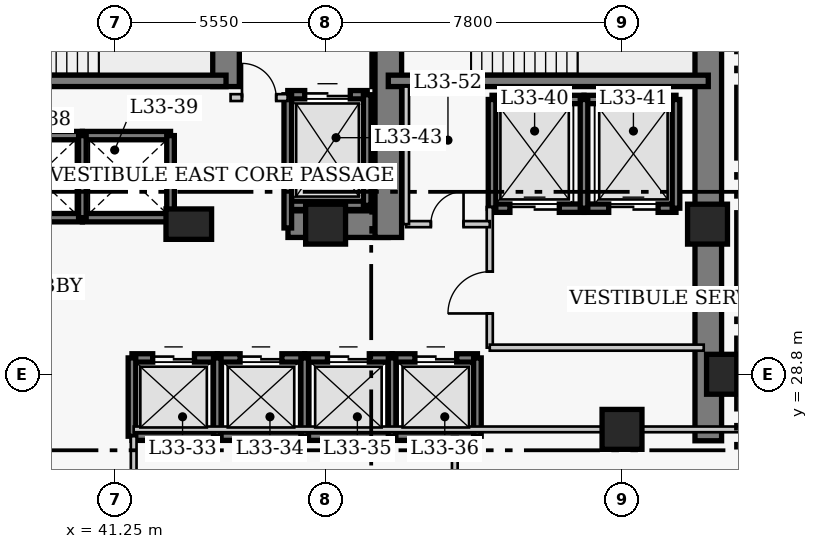
"""IFC4 building model, lengths in metres.
Left out: names, types, materials, properties, quantities, classifications, styles, units other than length and angle.
Written with IfcOpenShell. Run it as: python <this file> out.ifc"""

import sys

from ifc_helpers import new_model, si_unit, direction, frame, frame_2d, origin, origin_2d, place, context, subcontext, project, spatial, rectangle, extrude, element, fill, save


model = new_model("IFC4")
c1 = context("Model", 3, precision=1e-05, world=origin(), true_north=direction((0.0, 1.0)))
c2 = subcontext(c1, "Body", "Model", "MODEL_VIEW")
j1 = project(units=[si_unit("LENGTHUNIT", "METRE"), si_unit("PLANEANGLEUNIT", "RADIAN")], contexts=[c1])
p1 = place(None, origin())
s1 = spatial("IfcSite", under=j1, at=p1, CompositionType="ELEMENT")
p2 = place(p1, origin())
s2 = spatial("IfcBuilding", under=s1, at=p2, CompositionType="ELEMENT")
p3 = place(p2, frame((0.0, 0.0, 134.6)))
s3 = spatial("IfcBuildingStorey", under=s2, at=p3, CompositionType="ELEMENT", Elevation=134.6)
p4 = place(p3, frame((56.87, 27.05, 0.0), z_axis=(0.0, 0.0, 1.0), x_axis=(0.0, 1.0, 0.0)))
e1 = element("IfcWall", 1, at=p4, inside=s3, PredefinedType="SHEAR", context=c2, shape_type="SweptSolid", body=[
    extrude(rectangle(XDim=13.62, YDim=0.7, at=frame_2d((6.81, 0.0))), origin(), (0.0, 0.0, 1.0), 3.8),
])
p5 = place(p3, frame((45.81, 32.75, 0.0), z_axis=(0.0, 0.0, 1.0), x_axis=(1.0, 0.0, 0.0)))
e2 = element("IfcWall", 2, at=p5, inside=s3, PredefinedType="SHEAR", context=c2, shape_type="SweptSolid", body=[
    extrude(rectangle(XDim=2.64, YDim=0.7, at=frame_2d((1.32, 0.0))), origin(), (0.0, 0.0, 1.0), 3.8),
])
p6 = place(p3, frame((44.18, 36.37, 0.0), z_axis=(0.0, 0.0, 1.0), x_axis=(0.0, 1.0, 0.0)))
e3 = element("IfcWall", 3, at=p6, inside=s3, PredefinedType="SHEAR", context=c2, shape_type="SweptSolid", body=[
    extrude(rectangle(XDim=3.95, YDim=0.7, at=frame_2d((1.975, 0.0))), origin(), (0.0, 0.0, 1.0), 3.8),
])
p7 = place(p3, frame((48.45, 32.4, 0.0), z_axis=(0.0, 0.0, 1.0), x_axis=(0.0, 1.0, 0.0)))
e4 = element("IfcWall", 4, at=p7, inside=s3, PredefinedType="SHEAR", context=c2, shape_type="SweptSolid", body=[
    extrude(rectangle(XDim=7.92, YDim=0.7, at=frame_2d((3.96, 0.0))), origin(), (0.0, 0.0, 1.0), 3.8),
])
p8 = place(p7, frame((5.8, 0.0, 0.0)))
e5 = element("IfcOpeningElement", 5, at=p8, cuts=e4, PredefinedType="OPENING", context=c2, shape_type="SweptSolid", body=[
    extrude(rectangle(XDim=1.1, YDim=2.15, at=frame_2d((0.55, 1.075))), frame((0.0, 0.36, 0.0), z_axis=(0.0, -1.0, 0.0), x_axis=(1.0, 0.0, 0.0)), (0.0, 0.0, 1.0), 0.72),
])
p9 = place(p3, frame((35.85, 36.52, 0.0), z_axis=(0.0, 0.0, 1.0), x_axis=(1.0, 0.0, 0.0)))
e6 = element("IfcWall", 6, at=p9, inside=s3, PredefinedType="SHEAR", context=c2, shape_type="SweptSolid", body=[
    extrude(rectangle(XDim=8.33, YDim=0.3, at=frame_2d((4.165, 0.0))), origin(), (0.0, 0.0, 1.0), 3.8),
])
p10 = place(p3, frame((48.45, 36.52, 0.0), z_axis=(0.0, 0.0, 1.0), x_axis=(1.0, 0.0, 0.0)))
e7 = element("IfcWall", 7, at=p10, inside=s3, PredefinedType="SHEAR", context=c2, shape_type="SweptSolid", body=[
    extrude(rectangle(XDim=8.42, YDim=0.3, at=frame_2d((4.21, 0.0))), origin(), (0.0, 0.0, 1.0), 3.8),
])
p11 = place(p3, frame((57.35, 28.8, 0.0), z_axis=(0.0, 0.0, 1.0), x_axis=(1.0, 0.0, 0.0)))
e8 = element("IfcColumn", 8, at=p11, inside=s3, PredefinedType="COLUMN", context=c2, shape_type="SweptSolid", body=[
    extrude(rectangle(XDim=1.05, YDim=1.05, at=origin_2d()), origin(), (0.0, 0.0, 1.0), 3.8),
])
p12 = place(p3, frame((43.2, 32.75, 0.0), z_axis=(0.0, 0.0, 1.0), x_axis=(1.0, 0.0, 0.0)))
e9 = element("IfcColumn", 9, at=p12, inside=s3, PredefinedType="COLUMN", context=c2, shape_type="SweptSolid", body=[
    extrude(rectangle(XDim=1.2, YDim=0.8, at=origin_2d()), origin(), (0.0, 0.0, 1.0), 3.8),
])
for number, where, z_axis, x_axis in (
    (10, (46.8, 32.75, 0.0), (0.0, 0.0, 1.0), (1.0, 0.0, 0.0)),
    (11, (54.6, 27.35, 0.0), (0.0, 0.0, 1.0), (1.0, 0.0, 0.0)),
    (12, (56.85, 32.75, 0.0), (0.0, 0.0, 1.0), (1.0, 0.0, 0.0)),
):
    element("IfcColumn", number, at=place(p3, frame(where, z_axis=z_axis, x_axis=x_axis)), inside=s3, PredefinedType="COLUMN", context=c2, shape_type="SweptSolid", body=[
        extrude(rectangle(XDim=1.05, YDim=1.05, at=origin_2d()), origin(), (0.0, 0.0, 1.0), 3.8),
    ])
p13 = place(p3, frame((41.705, 29.23, 0.0), z_axis=(0.0, 0.0, 1.0), x_axis=(1.0, 0.0, 0.0)))
e13 = element("IfcWall", 13, at=p13, inside=s3, PredefinedType="SHEAR", context=c2, shape_type="SweptSolid", body=[
    extrude(rectangle(XDim=2.245, YDim=0.22, at=frame_2d((1.123, 0.0))), origin(), (0.0, 0.0, 1.0), 3.8),
])
p14 = place(p13, frame((0.545, 0.0, 0.0)))
e14 = element("IfcOpeningElement", 14, at=p14, cuts=e13, PredefinedType="OPENING", context=c2, shape_type="SweptSolid", body=[
    extrude(rectangle(XDim=1.1, YDim=2.15, at=frame_2d((0.55, 1.075))), frame((0.0, 0.12, 0.0), z_axis=(0.0, -1.0, 0.0), x_axis=(1.0, 0.0, 0.0)), (0.0, 0.0, 1.0), 0.24),
])
p15 = place(p3, frame((41.705, 27.17, 0.0), z_axis=(0.0, 0.0, 1.0), x_axis=(1.0, 0.0, 0.0)))
e15 = element("IfcWall", 15, at=p15, inside=s3, PredefinedType="SHEAR", context=c2, shape_type="SweptSolid", body=[
    extrude(rectangle(XDim=2.245, YDim=0.22, at=frame_2d((1.123, 0.0))), origin(), (0.0, 0.0, 1.0), 3.8),
])
p16 = place(p3, frame((41.705, 27.17, 0.0), z_axis=(0.0, 0.0, 1.0), x_axis=(0.0, 1.0, 0.0)))
e16 = element("IfcWall", 16, at=p16, inside=s3, PredefinedType="SHEAR", context=c2, shape_type="SweptSolid", body=[
    extrude(rectangle(XDim=2.06, YDim=0.2, at=frame_2d((1.03, 0.0))), origin(), (0.0, 0.0, 1.0), 3.8),
])
p17 = place(p3, frame((43.95, 29.23, 0.0), z_axis=(0.0, 0.0, 1.0), x_axis=(1.0, 0.0, 0.0)))
e17 = element("IfcWall", 17, at=p17, inside=s3, PredefinedType="SHEAR", context=c2, shape_type="SweptSolid", body=[
    extrude(rectangle(XDim=2.3, YDim=0.22, at=frame_2d((1.15, 0.0))), origin(), (0.0, 0.0, 1.0), 3.8),
])
p18 = place(p17, frame((0.6, 0.0, 0.0)))
e18 = element("IfcOpeningElement", 18, at=p18, cuts=e17, PredefinedType="OPENING", context=c2, shape_type="SweptSolid", body=[
    extrude(rectangle(XDim=1.1, YDim=2.15, at=frame_2d((0.55, 1.075))), frame((0.0, 0.12, 0.0), z_axis=(0.0, -1.0, 0.0), x_axis=(1.0, 0.0, 0.0)), (0.0, 0.0, 1.0), 0.24),
])
p19 = place(p3, frame((43.95, 27.17, 0.0), z_axis=(0.0, 0.0, 1.0), x_axis=(1.0, 0.0, 0.0)))
e19 = element("IfcWall", 19, at=p19, inside=s3, PredefinedType="SHEAR", context=c2, shape_type="SweptSolid", body=[
    extrude(rectangle(XDim=2.3, YDim=0.22, at=frame_2d((1.15, 0.0))), origin(), (0.0, 0.0, 1.0), 3.8),
])
p20 = place(p3, frame((43.95, 27.17, 0.0), z_axis=(0.0, 0.0, 1.0), x_axis=(0.0, 1.0, 0.0)))
e20 = element("IfcWall", 20, at=p20, inside=s3, PredefinedType="SHEAR", context=c2, shape_type="SweptSolid", body=[
    extrude(rectangle(XDim=2.06, YDim=0.2, at=frame_2d((1.03, 0.0))), origin(), (0.0, 0.0, 1.0), 3.8),
])
p21 = place(p3, frame((46.25, 29.23, 0.0), z_axis=(0.0, 0.0, 1.0), x_axis=(1.0, 0.0, 0.0)))
e21 = element("IfcWall", 21, at=p21, inside=s3, PredefinedType="SHEAR", context=c2, shape_type="SweptSolid", body=[
    extrude(rectangle(XDim=2.3, YDim=0.22, at=frame_2d((1.15, 0.0))), origin(), (0.0, 0.0, 1.0), 3.8),
])
p22 = place(p21, frame((0.6, 0.0, 0.0)))
e22 = element("IfcOpeningElement", 22, at=p22, cuts=e21, PredefinedType="OPENING", context=c2, shape_type="SweptSolid", body=[
    extrude(rectangle(XDim=1.1, YDim=2.15, at=frame_2d((0.55, 1.075))), frame((0.0, 0.12, 0.0), z_axis=(0.0, -1.0, 0.0), x_axis=(1.0, 0.0, 0.0)), (0.0, 0.0, 1.0), 0.24),
])
p23 = place(p3, frame((46.25, 27.17, 0.0), z_axis=(0.0, 0.0, 1.0), x_axis=(1.0, 0.0, 0.0)))
e23 = element("IfcWall", 23, at=p23, inside=s3, PredefinedType="SHEAR", context=c2, shape_type="SweptSolid", body=[
    extrude(rectangle(XDim=2.3, YDim=0.22, at=frame_2d((1.15, 0.0))), origin(), (0.0, 0.0, 1.0), 3.8),
])
p24 = place(p3, frame((46.25, 27.17, 0.0), z_axis=(0.0, 0.0, 1.0), x_axis=(0.0, 1.0, 0.0)))
e24 = element("IfcWall", 24, at=p24, inside=s3, PredefinedType="SHEAR", context=c2, shape_type="SweptSolid", body=[
    extrude(rectangle(XDim=2.06, YDim=0.2, at=frame_2d((1.03, 0.0))), origin(), (0.0, 0.0, 1.0), 3.8),
])
p25 = place(p3, frame((48.55, 29.23, 0.0), z_axis=(0.0, 0.0, 1.0), x_axis=(1.0, 0.0, 0.0)))
e25 = element("IfcWall", 25, at=p25, inside=s3, PredefinedType="SHEAR", context=c2, shape_type="SweptSolid", body=[
    extrude(rectangle(XDim=2.245, YDim=0.22, at=frame_2d((1.123, 0.0))), origin(), (0.0, 0.0, 1.0), 3.8),
])
p26 = place(p25, frame((0.6, 0.0, 0.0)))
e26 = element("IfcOpeningElement", 26, at=p26, cuts=e25, PredefinedType="OPENING", context=c2, shape_type="SweptSolid", body=[
    extrude(rectangle(XDim=1.1, YDim=2.15, at=frame_2d((0.55, 1.075))), frame((0.0, 0.12, 0.0), z_axis=(0.0, -1.0, 0.0), x_axis=(1.0, 0.0, 0.0)), (0.0, 0.0, 1.0), 0.24),
])
p27 = place(p3, frame((48.55, 27.17, 0.0), z_axis=(0.0, 0.0, 1.0), x_axis=(1.0, 0.0, 0.0)))
e27 = element("IfcWall", 27, at=p27, inside=s3, PredefinedType="SHEAR", context=c2, shape_type="SweptSolid", body=[
    extrude(rectangle(XDim=2.245, YDim=0.22, at=frame_2d((1.123, 0.0))), origin(), (0.0, 0.0, 1.0), 3.8),
])
for number, where, z_axis, x_axis in (
    (28, (48.55, 27.17, 0.0), (0.0, 0.0, 1.0), (0.0, 1.0, 0.0)),
    (29, (50.795, 27.17, 0.0), (0.0, 0.0, 1.0), (0.0, 1.0, 0.0)),
):
    element("IfcWall", number, at=place(p3, frame(where, z_axis=z_axis, x_axis=x_axis)), inside=s3, PredefinedType="SHEAR", context=c2, shape_type="SweptSolid", body=[
        extrude(rectangle(XDim=2.06, YDim=0.2, at=frame_2d((1.03, 0.0))), origin(), (0.0, 0.0, 1.0), 3.8),
    ])
for number, where, z_axis, x_axis in (
    (30, (38.0, 35.08, 0.0), (0.0, 0.0, 1.0), (1.0, 0.0, 0.0)),
    (31, (38.0, 32.92, 0.0), (0.0, 0.0, 1.0), (1.0, 0.0, 0.0)),
):
    element("IfcWall", number, at=place(p3, frame(where, z_axis=z_axis, x_axis=x_axis)), inside=s3, PredefinedType="SHEAR", context=c2, shape_type="SweptSolid", body=[
        extrude(rectangle(XDim=2.4, YDim=0.22, at=frame_2d((1.2, 0.0))), origin(), (0.0, 0.0, 1.0), 3.8),
    ])
for number, where, z_axis, x_axis in (
    (32, (40.4, 35.08, 0.0), (0.0, 0.0, 1.0), (1.0, 0.0, 0.0)),
    (33, (40.4, 32.92, 0.0), (0.0, 0.0, 1.0), (1.0, 0.0, 0.0)),
):
    element("IfcWall", number, at=place(p3, frame(where, z_axis=z_axis, x_axis=x_axis)), inside=s3, PredefinedType="SHEAR", context=c2, shape_type="SweptSolid", body=[
        extrude(rectangle(XDim=2.32, YDim=0.22, at=frame_2d((1.16, 0.0))), origin(), (0.0, 0.0, 1.0), 3.8),
    ])
for number, where, z_axis, x_axis in (
    (34, (40.4, 32.92, 0.0), (0.0, 0.0, 1.0), (0.0, 1.0, 0.0)),
    (35, (42.72, 32.92, 0.0), (0.0, 0.0, 1.0), (0.0, 1.0, 0.0)),
):
    element("IfcWall", number, at=place(p3, frame(where, z_axis=z_axis, x_axis=x_axis)), inside=s3, PredefinedType="SHEAR", context=c2, shape_type="SweptSolid", body=[
        extrude(rectangle(XDim=2.16, YDim=0.2, at=frame_2d((1.08, 0.0))), origin(), (0.0, 0.0, 1.0), 3.8),
    ])
p28 = place(p3, frame((51.18, 36.03, 0.0), z_axis=(0.0, 0.0, 1.0), x_axis=(1.0, 0.0, 0.0)))
e36 = element("IfcWall", 36, at=p28, inside=s3, PredefinedType="SHEAR", context=c2, shape_type="SweptSolid", body=[
    extrude(rectangle(XDim=2.42, YDim=0.22, at=frame_2d((1.21, 0.0))), origin(), (0.0, 0.0, 1.0), 3.8),
])
p29 = place(p3, frame((51.18, 33.17, 0.0), z_axis=(0.0, 0.0, 1.0), x_axis=(1.0, 0.0, 0.0)))
e37 = element("IfcWall", 37, at=p29, inside=s3, PredefinedType="SHEAR", context=c2, shape_type="SweptSolid", body=[
    extrude(rectangle(XDim=2.42, YDim=0.22, at=frame_2d((1.21, 0.0))), origin(), (0.0, 0.0, 1.0), 3.8),
])
p30 = place(p29, frame((0.47, 0.0, 0.0)))
e38 = element("IfcOpeningElement", 38, at=p30, cuts=e37, PredefinedType="OPENING", context=c2, shape_type="SweptSolid", body=[
    extrude(rectangle(XDim=1.3, YDim=2.15, at=frame_2d((0.65, 1.075))), frame((0.0, 0.12, 0.0), z_axis=(0.0, -1.0, 0.0), x_axis=(1.0, 0.0, 0.0)), (0.0, 0.0, 1.0), 0.24),
])
p31 = place(p3, frame((51.18, 33.17, 0.0), z_axis=(0.0, 0.0, 1.0), x_axis=(0.0, 1.0, 0.0)))
e39 = element("IfcWall", 39, at=p31, inside=s3, PredefinedType="SHEAR", context=c2, shape_type="SweptSolid", body=[
    extrude(rectangle(XDim=2.86, YDim=0.2, at=frame_2d((1.43, 0.0))), origin(), (0.0, 0.0, 1.0), 3.8),
])
p32 = place(p3, frame((53.6, 36.03, 0.0), z_axis=(0.0, 0.0, 1.0), x_axis=(1.0, 0.0, 0.0)))
e40 = element("IfcWall", 40, at=p32, inside=s3, PredefinedType="SHEAR", context=c2, shape_type="SweptSolid", body=[
    extrude(rectangle(XDim=2.42, YDim=0.22, at=frame_2d((1.21, 0.0))), origin(), (0.0, 0.0, 1.0), 3.8),
])
p33 = place(p3, frame((53.6, 33.17, 0.0), z_axis=(0.0, 0.0, 1.0), x_axis=(1.0, 0.0, 0.0)))
e41 = element("IfcWall", 41, at=p33, inside=s3, PredefinedType="SHEAR", context=c2, shape_type="SweptSolid", body=[
    extrude(rectangle(XDim=2.42, YDim=0.22, at=frame_2d((1.21, 0.0))), origin(), (0.0, 0.0, 1.0), 3.8),
])
p34 = place(p33, frame((0.65, 0.0, 0.0)))
e42 = element("IfcOpeningElement", 42, at=p34, cuts=e41, PredefinedType="OPENING", context=c2, shape_type="SweptSolid", body=[
    extrude(rectangle(XDim=1.3, YDim=2.15, at=frame_2d((0.65, 1.075))), frame((0.0, 0.12, 0.0), z_axis=(0.0, -1.0, 0.0), x_axis=(1.0, 0.0, 0.0)), (0.0, 0.0, 1.0), 0.24),
])
for number, where, z_axis, x_axis in (
    (43, (53.6, 33.17, 0.0), (0.0, 0.0, 1.0), (0.0, 1.0, 0.0)),
    (44, (56.02, 33.17, 0.0), (0.0, 0.0, 1.0), (0.0, 1.0, 0.0)),
):
    element("IfcWall", number, at=place(p3, frame(where, z_axis=z_axis, x_axis=x_axis)), inside=s3, PredefinedType="SHEAR", context=c2, shape_type="SweptSolid", body=[
        extrude(rectangle(XDim=2.86, YDim=0.2, at=frame_2d((1.43, 0.0))), origin(), (0.0, 0.0, 1.0), 3.8),
    ])
p35 = place(p3, frame((45.805, 36.155, 0.0), z_axis=(0.0, 0.0, 1.0), x_axis=(1.0, 0.0, 0.0)))
e45 = element("IfcWall", 45, at=p35, inside=s3, PredefinedType="SHEAR", context=c2, shape_type="SweptSolid", body=[
    extrude(rectangle(XDim=2.09, YDim=0.22, at=frame_2d((1.045, 0.0))), origin(), (0.0, 0.0, 1.0), 3.8),
])
p36 = place(p35, frame((0.445, 0.0, 0.0)))
e46 = element("IfcOpeningElement", 46, at=p36, cuts=e45, PredefinedType="OPENING", context=c2, shape_type="SweptSolid", body=[
    extrude(rectangle(XDim=1.2, YDim=2.15, at=frame_2d((0.6, 1.075))), frame((0.0, 0.12, 0.0), z_axis=(0.0, -1.0, 0.0), x_axis=(1.0, 0.0, 0.0)), (0.0, 0.0, 1.0), 0.24),
])
p37 = place(p3, frame((45.805, 33.245, 0.0), z_axis=(0.0, 0.0, 1.0), x_axis=(1.0, 0.0, 0.0)))
e47 = element("IfcWall", 47, at=p37, inside=s3, PredefinedType="SHEAR", context=c2, shape_type="SweptSolid", body=[
    extrude(rectangle(XDim=2.09, YDim=0.22, at=frame_2d((1.045, 0.0))), origin(), (0.0, 0.0, 1.0), 3.8),
])
p38 = place(p3, frame((45.805, 32.65, 0.0), z_axis=(0.0, 0.0, 1.0), x_axis=(0.0, 1.0, 0.0)))
e48 = element("IfcWall", 48, at=p38, inside=s3, PredefinedType="SHEAR", context=c2, shape_type="SweptSolid", body=[
    extrude(rectangle(XDim=3.505, YDim=0.2, at=frame_2d((1.752, 0.0))), origin(), (0.0, 0.0, 1.0), 3.8),
])
p39 = place(p3, frame((47.895, 33.245, 0.0), z_axis=(0.0, 0.0, 1.0), x_axis=(0.0, 1.0, 0.0)))
e49 = element("IfcWall", 49, at=p39, inside=s3, PredefinedType="SHEAR", context=c2, shape_type="SweptSolid", body=[
    extrude(rectangle(XDim=2.91, YDim=0.2, at=frame_2d((1.455, 0.0))), origin(), (0.0, 0.0, 1.0), 3.8),
])
p40 = place(p3, frame((44.3, 36.08, 0.0), z_axis=(0.0, 0.0, 1.0), x_axis=(1.0, 0.0, 0.0)))
e50 = element("IfcWall", 50, at=p40, inside=s3, PredefinedType="PARTITIONING", context=c2, shape_type="SweptSolid", body=[
    extrude(rectangle(XDim=1.5, YDim=0.18, at=frame_2d((0.75, 0.0))), origin(), (0.0, 0.0, 1.0), 3.55),
])
p41 = place(p40, frame((0.3, 0.0, 0.0)))
e51 = element("IfcOpeningElement", 51, at=p41, cuts=e50, PredefinedType="OPENING", context=c2, shape_type="SweptSolid", body=[
    extrude(rectangle(XDim=0.9, YDim=2.15, at=frame_2d((0.45, 1.075))), frame((0.0, 0.1, 0.0), z_axis=(0.0, -1.0, 0.0), x_axis=(1.0, 0.0, 0.0)), (0.0, 0.0, 1.0), 0.2),
])
p42 = place(p3, frame((51.12, 29.5, 0.0), z_axis=(0.0, 0.0, 1.0), x_axis=(0.0, 1.0, 0.0)))
e52 = element("IfcWall", 52, at=p42, inside=s3, PredefinedType="PARTITIONING", context=c2, shape_type="SweptSolid", body=[
    extrude(rectangle(XDim=3.7, YDim=0.16, at=frame_2d((1.85, 0.0))), origin(), (0.0, 0.0, 1.0), 3.55),
])
p43 = place(p42, frame((0.9, 0.0, 0.0)))
e53 = element("IfcOpeningElement", 53, at=p43, cuts=e52, PredefinedType="OPENING", context=c2, shape_type="SweptSolid", body=[
    extrude(rectangle(XDim=1.1, YDim=2.15, at=frame_2d((0.55, 1.075))), frame((0.0, 0.09, 0.0), z_axis=(0.0, -1.0, 0.0), x_axis=(1.0, 0.0, 0.0)), (0.0, 0.0, 1.0), 0.18),
])
p44 = place(p3, frame((51.12, 29.5, 0.0), z_axis=(0.0, 0.0, 1.0), x_axis=(1.0, 0.0, 0.0)))
e54 = element("IfcWall", 54, at=p44, inside=s3, PredefinedType="PARTITIONING", context=c2, shape_type="SweptSolid", body=[
    extrude(rectangle(XDim=5.63, YDim=0.16, at=frame_2d((2.815, 0.0))), origin(), (0.0, 0.0, 1.0), 3.55),
])
p45 = place(p3, frame((48.92, 32.75, 0.0), z_axis=(0.0, 0.0, 1.0), x_axis=(1.0, 0.0, 0.0)))
e55 = element("IfcWall", 55, at=p45, inside=s3, PredefinedType="PARTITIONING", context=c2, shape_type="SweptSolid", body=[
    extrude(rectangle(XDim=2.2, YDim=0.16, at=frame_2d((1.1, 0.0))), origin(), (0.0, 0.0, 1.0), 3.55),
])
p46 = place(p45, frame((0.65, 0.0, 0.0)))
e56 = element("IfcOpeningElement", 56, at=p46, cuts=e55, PredefinedType="OPENING", context=c2, shape_type="SweptSolid", body=[
    extrude(rectangle(XDim=0.86, YDim=2.05, at=frame_2d((0.43, 1.025))), frame((0.0, 0.09, 0.0), z_axis=(0.0, -1.0, 0.0), x_axis=(1.0, 0.0, 0.0)), (0.0, 0.0, 1.0), 0.18),
])
p47 = place(p3, frame((48.92, 32.75, 0.0), z_axis=(0.0, 0.0, 1.0), x_axis=(0.0, 1.0, 0.0)))
e57 = element("IfcWall", 57, at=p47, inside=s3, PredefinedType="PARTITIONING", context=c2, shape_type="SweptSolid", body=[
    extrude(rectangle(XDim=3.62, YDim=0.15, at=frame_2d((1.81, 0.0))), origin(), (0.0, 0.0, 1.0), 3.55),
])
p48 = place(p3, frame((41.75, 16.66, 0.0), z_axis=(0.0, 0.0, 1.0), x_axis=(0.0, 1.0, 0.0)))
e58 = element("IfcWall", 58, at=p48, inside=s3, PredefinedType="PARTITIONING", context=c2, shape_type="SweptSolid", body=[
    extrude(rectangle(XDim=10.51, YDim=0.15, at=frame_2d((5.255, 0.0))), origin(), (0.0, 0.0, 1.0), 3.55),
])
p49 = place(p3, frame((50.2, 16.66, 0.0), z_axis=(0.0, 0.0, 1.0), x_axis=(0.0, 1.0, 0.0)))
e59 = element("IfcWall", 59, at=p49, inside=s3, PredefinedType="PARTITIONING", context=c2, shape_type="SweptSolid", body=[
    extrude(rectangle(XDim=10.49, YDim=0.15, at=frame_2d((5.245, 0.0))), origin(), (0.0, 0.0, 1.0), 3.55),
])
p50 = place(p3, frame((41.75, 27.35, 0.0), z_axis=(0.0, 0.0, 1.0), x_axis=(1.0, 0.0, 0.0)))
e60 = element("IfcWall", 60, at=p50, inside=s3, PredefinedType="PARTITIONING", context=c2, shape_type="SweptSolid", body=[
    extrude(rectangle(XDim=16.84, YDim=0.15, at=frame_2d((8.42, 0.0))), origin(), (0.0, 0.0, 1.0), 3.55),
])
p51 = place(p14, origin())
e61 = element("IfcDoor", 61, at=p51, inside=s3, OperationType="DOUBLE_DOOR_SLIDING", PredefinedType="DOOR", context=c2, shape_type="SweptSolid", body=[
    extrude(rectangle(XDim=1.1, YDim=2.15, at=frame_2d((0.55, 1.075))), frame((0.0, 0.025, 0.0), z_axis=(0.0, -1.0, 0.0), x_axis=(1.0, 0.0, 0.0)), (0.0, 0.0, 1.0), 0.05),
])
fill(e14, e61)
p52 = place(p18, origin())
e62 = element("IfcDoor", 62, at=p52, inside=s3, OperationType="DOUBLE_DOOR_SLIDING", PredefinedType="DOOR", context=c2, shape_type="SweptSolid", body=[
    extrude(rectangle(XDim=1.1, YDim=2.15, at=frame_2d((0.55, 1.075))), frame((0.0, 0.025, 0.0), z_axis=(0.0, -1.0, 0.0), x_axis=(1.0, 0.0, 0.0)), (0.0, 0.0, 1.0), 0.05),
])
fill(e18, e62)
p53 = place(p22, origin())
e63 = element("IfcDoor", 63, at=p53, inside=s3, OperationType="DOUBLE_DOOR_SLIDING", PredefinedType="DOOR", context=c2, shape_type="SweptSolid", body=[
    extrude(rectangle(XDim=1.1, YDim=2.15, at=frame_2d((0.55, 1.075))), frame((0.0, 0.025, 0.0), z_axis=(0.0, -1.0, 0.0), x_axis=(1.0, 0.0, 0.0)), (0.0, 0.0, 1.0), 0.05),
])
fill(e22, e63)
p54 = place(p26, origin())
e64 = element("IfcDoor", 64, at=p54, inside=s3, OperationType="DOUBLE_DOOR_SLIDING", PredefinedType="DOOR", context=c2, shape_type="SweptSolid", body=[
    extrude(rectangle(XDim=1.1, YDim=2.15, at=frame_2d((0.55, 1.075))), frame((0.0, 0.025, 0.0), z_axis=(0.0, -1.0, 0.0), x_axis=(1.0, 0.0, 0.0)), (0.0, 0.0, 1.0), 0.05),
])
fill(e26, e64)
p55 = place(p30, origin())
e65 = element("IfcDoor", 65, at=p55, inside=s3, OperationType="DOUBLE_DOOR_SLIDING", PredefinedType="DOOR", context=c2, shape_type="SweptSolid", body=[
    extrude(rectangle(XDim=1.3, YDim=2.15, at=frame_2d((0.65, 1.075))), frame((0.0, 0.025, 0.0), z_axis=(0.0, -1.0, 0.0), x_axis=(1.0, 0.0, 0.0)), (0.0, 0.0, 1.0), 0.05),
])
fill(e38, e65)
p56 = place(p34, origin())
e66 = element("IfcDoor", 66, at=p56, inside=s3, OperationType="DOUBLE_DOOR_SLIDING", PredefinedType="DOOR", context=c2, shape_type="SweptSolid", body=[
    extrude(rectangle(XDim=1.3, YDim=2.15, at=frame_2d((0.65, 1.075))), frame((0.0, 0.025, 0.0), z_axis=(0.0, -1.0, 0.0), x_axis=(1.0, 0.0, 0.0)), (0.0, 0.0, 1.0), 0.05),
])
fill(e42, e66)
p57 = place(p36, origin())
e67 = element("IfcDoor", 67, at=p57, inside=s3, OperationType="DOUBLE_DOOR_SLIDING", PredefinedType="DOOR", context=c2, shape_type="SweptSolid", body=[
    extrude(rectangle(XDim=1.2, YDim=2.15, at=frame_2d((0.6, 1.075))), frame((0.0, 0.025, 0.0), z_axis=(0.0, -1.0, 0.0), x_axis=(1.0, 0.0, 0.0)), (0.0, 0.0, 1.0), 0.05),
])
fill(e46, e67)
p58 = place(p41, origin())
e68 = element("IfcDoor", 68, at=p58, inside=s3, OperationType="SINGLE_SWING_LEFT", PredefinedType="DOOR", context=c2, shape_type="SweptSolid", body=[
    extrude(rectangle(XDim=0.9, YDim=2.15, at=frame_2d((0.45, 1.075))), frame((0.0, 0.025, 0.0), z_axis=(0.0, -1.0, 0.0), x_axis=(1.0, 0.0, 0.0)), (0.0, 0.0, 1.0), 0.05),
])
fill(e51, e68)
p59 = place(p43, origin())
e69 = element("IfcDoor", 69, at=p59, inside=s3, OperationType="SINGLE_SWING_LEFT", PredefinedType="DOOR", context=c2, shape_type="SweptSolid", body=[
    extrude(rectangle(XDim=1.1, YDim=2.15, at=frame_2d((0.55, 1.075))), frame((0.0, 0.025, 0.0), z_axis=(0.0, -1.0, 0.0), x_axis=(1.0, 0.0, 0.0)), (0.0, 0.0, 1.0), 0.05),
])
fill(e53, e69)
p60 = place(p46, origin())
e70 = element("IfcDoor", 70, at=p60, inside=s3, OperationType="SINGLE_SWING_RIGHT", PredefinedType="DOOR", context=c2, shape_type="SweptSolid", body=[
    extrude(rectangle(XDim=0.86, YDim=2.05, at=frame_2d((0.43, 1.025))), frame((0.0, 0.025, 0.0), z_axis=(0.0, -1.0, 0.0), x_axis=(1.0, 0.0, 0.0)), (0.0, 0.0, 1.0), 0.05),
])
fill(e56, e70)
save(model, sys.argv[1])
